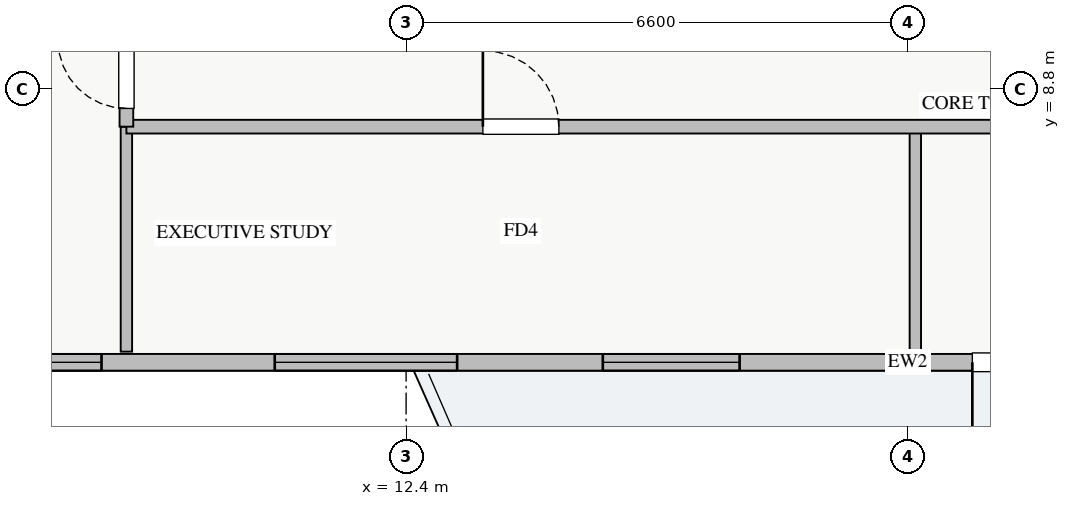
"""IFC4 building model, lengths in metres.
Left out: names, types, materials, properties, quantities, classifications, styles, units other than length and angle.
Written with IfcOpenShell. Run it as: python <this file> out.ifc"""

import sys

from ifc_helpers import new_model, si_unit, direction, frame, frame_2d, origin, place, context, subcontext, project, spatial, rectangle, extrude, source, transform, mapped, element, fill, save


model = new_model("IFC4")
c1 = context("Model", 3, precision=1e-05, world=origin(), true_north=direction((0.0, 1.0)))
c2 = subcontext(c1, "Body", "Model", "MODEL_VIEW")
j1 = project(units=[si_unit("LENGTHUNIT", "METRE"), si_unit("PLANEANGLEUNIT", "RADIAN")], contexts=[c1])
p1 = place(None, origin())
s1 = spatial("IfcSite", under=j1, at=p1, CompositionType="ELEMENT")
p2 = place(p1, origin())
s2 = spatial("IfcBuilding", under=s1, at=p2, CompositionType="ELEMENT")
p3 = place(p2, frame((0.0, 0.0, 126.25)))
s3 = spatial("IfcBuildingStorey", under=s2, at=p3, CompositionType="ELEMENT", Elevation=126.25)
p4 = place(p3, frame((6.55, 5.21, 0.0), z_axis=(0.0, 0.0, 1.0), x_axis=(1.0, 0.0, 0.0)))
e1 = element("IfcWall", 1, at=p4, inside=s3, PredefinedType="STANDARD", context=c2, shape_type="SweptSolid", body=[
    extrude(rectangle(XDim=24.9, YDim=0.22, at=frame_2d((12.45, 0.0))), origin(), (0.0, 0.0, 1.0), 2.61),
])
p5 = place(p4, frame((13.3, 0.0, 0.0)))
e2 = element("IfcOpeningElement", 2, at=p5, cuts=e1, PredefinedType="OPENING", context=c2, shape_type="SweptSolid", body=[
    extrude(rectangle(XDim=1.2, YDim=2.1, at=frame_2d((0.6, 1.05))), frame((0.0, 0.12, 0.0), z_axis=(0.0, -1.0, 0.0), x_axis=(1.0, 0.0, 0.0)), (0.0, 0.0, 1.0), 0.24),
])
p6 = place(p4, frame((0.343, 0.0, 0.9)))
e3 = element("IfcOpeningElement", 3, at=p6, cuts=e1, PredefinedType="OPENING", context=c2, shape_type="SweptSolid", body=[
    extrude(rectangle(XDim=1.5, YDim=1.5, at=frame_2d((0.75, 0.75))), frame((0.0, 0.12, 0.0), z_axis=(0.0, -1.0, 0.0), x_axis=(1.0, 0.0, 0.0)), (0.0, 0.0, 1.0), 0.24),
])
p7 = place(p4, frame((8.438, 0.0, 0.9)))
e4 = element("IfcOpeningElement", 4, at=p7, cuts=e1, PredefinedType="OPENING", context=c2, shape_type="SweptSolid", body=[
    extrude(rectangle(XDim=1.8, YDim=1.45, at=frame_2d((0.9, 0.725))), frame((0.0, 0.12, 0.0), z_axis=(0.0, -1.0, 0.0), x_axis=(1.0, 0.0, 0.0)), (0.0, 0.0, 1.0), 0.24),
])
p8 = place(p4, frame((14.813, 0.0, 0.9)))
e5 = element("IfcOpeningElement", 5, at=p8, cuts=e1, PredefinedType="OPENING", context=c2, shape_type="SweptSolid", body=[
    extrude(rectangle(XDim=1.5, YDim=1.45, at=frame_2d((0.75, 0.725))), frame((0.0, 0.12, 0.0), z_axis=(0.0, -1.0, 0.0), x_axis=(1.0, 0.0, 0.0)), (0.0, 0.0, 1.0), 0.24),
])
p9 = place(p4, frame((20.738, 0.0, 0.9)))
e6 = element("IfcOpeningElement", 6, at=p9, cuts=e1, PredefinedType="OPENING", context=c2, shape_type="SweptSolid", body=[
    extrude(rectangle(XDim=2.1, YDim=1.48, at=frame_2d((1.05, 0.74))), frame((0.0, 0.12, 0.0), z_axis=(0.0, -1.0, 0.0), x_axis=(1.0, 0.0, 0.0)), (0.0, 0.0, 1.0), 0.24),
])
p10 = place(p4, frame((4.122, 0.0, 0.9)))
e7 = element("IfcOpeningElement", 7, at=p10, cuts=e1, PredefinedType="OPENING", context=c2, shape_type="SweptSolid", body=[
    extrude(rectangle(XDim=2.4, YDim=1.5, at=frame_2d((1.2, 0.75))), frame((0.0, 0.12, 0.0), z_axis=(0.0, -1.0, 0.0), x_axis=(1.0, 0.0, 0.0)), (0.0, 0.0, 1.0), 0.24),
])
p11 = place(p3, frame((19.1, 5.35, 0.0), z_axis=(0.0, 0.0, 1.0), x_axis=(0.0, 1.0, 0.0)))
e8 = element("IfcWall", 8, at=p11, inside=s3, PredefinedType="PARTITIONING", context=c2, shape_type="SweptSolid", body=[
    extrude(rectangle(XDim=2.96, YDim=0.15, at=frame_2d((1.48, 0.0))), origin(), (0.0, 0.0, 1.0), 2.715),
])
p12 = place(p3, frame((8.72, 5.35, 0.0), z_axis=(0.0, 0.0, 1.0), x_axis=(0.0, 1.0, 0.0)))
e9 = element("IfcWall", 9, at=p12, inside=s3, PredefinedType="PARTITIONING", context=c2, shape_type="SweptSolid", body=[
    extrude(rectangle(XDim=2.96, YDim=0.15, at=frame_2d((1.48, 0.0))), origin(), (0.0, 0.0, 1.0), 3.07),
])
p13 = place(p3, frame((8.72, 8.31, 0.0), z_axis=(0.0, 0.0, 1.0), x_axis=(1.0, 0.0, 0.0)))
e10 = element("IfcWall", 10, at=p13, inside=s3, PredefinedType="PARTITIONING", context=c2, shape_type="SweptSolid", body=[
    extrude(rectangle(XDim=23.63, YDim=0.18, at=frame_2d((11.815, 0.0))), origin(), (0.0, 0.0, 1.0), 3.07),
])
p14 = place(p13, frame((4.69, 0.0, 0.0)))
e11 = element("IfcOpeningElement", 11, at=p14, cuts=e10, PredefinedType="OPENING", context=c2, shape_type="SweptSolid", body=[
    extrude(rectangle(XDim=1.0, YDim=2.05, at=frame_2d((0.5, 1.025))), frame((0.0, 0.1, 0.0), z_axis=(0.0, -1.0, 0.0), x_axis=(1.0, 0.0, 0.0)), (0.0, 0.0, 1.0), 0.2),
])
p15 = place(p13, frame((16.32, 0.0, 0.0)))
e12 = element("IfcOpeningElement", 12, at=p15, cuts=e10, PredefinedType="OPENING", context=c2, shape_type="SweptSolid", body=[
    extrude(rectangle(XDim=1.0, YDim=2.05, at=frame_2d((0.5, 1.025))), frame((0.0, 0.1, 0.0), z_axis=(0.0, -1.0, 0.0), x_axis=(1.0, 0.0, 0.0)), (0.0, 0.0, 1.0), 0.2),
])
p16 = place(p3, frame((8.72, 8.31, 0.0), z_axis=(0.0, 0.0, 1.0), x_axis=(0.0, 1.0, 0.0)))
e13 = element("IfcWall", 13, at=p16, inside=s3, PredefinedType="PARTITIONING", context=c2, shape_type="SweptSolid", body=[
    extrude(rectangle(XDim=29.37, YDim=0.18, at=frame_2d((14.685, 0.0))), origin(), (0.0, 0.0, 1.0), 3.07),
])
p17 = place(p16, frame((28.06, 0.0, 0.0)))
e14 = element("IfcOpeningElement", 14, at=p17, cuts=e13, PredefinedType="OPENING", context=c2, shape_type="SweptSolid", body=[
    extrude(rectangle(XDim=0.9, YDim=2.05, at=frame_2d((0.45, 1.025))), frame((0.0, 0.1, 0.0), z_axis=(0.0, -1.0, 0.0), x_axis=(1.0, 0.0, 0.0)), (0.0, 0.0, 1.0), 0.2),
])
p18 = place(p16, frame((0.24, 0.0, 0.0)))
e15 = element("IfcOpeningElement", 15, at=p18, cuts=e13, PredefinedType="OPENING", context=c2, shape_type="SweptSolid", body=[
    extrude(rectangle(XDim=0.9, YDim=2.05, at=frame_2d((0.45, 1.025))), frame((0.0, 0.1, 0.0), z_axis=(0.0, -1.0, 0.0), x_axis=(1.0, 0.0, 0.0)), (0.0, 0.0, 1.0), 0.2),
])
p19 = place(p16, frame((2.92, 0.0, 0.0)))
e16 = element("IfcOpeningElement", 16, at=p19, cuts=e13, PredefinedType="OPENING", context=c2, shape_type="SweptSolid", body=[
    extrude(rectangle(XDim=1.0, YDim=2.05, at=frame_2d((0.5, 1.025))), frame((0.0, 0.1, 0.0), z_axis=(0.0, -1.0, 0.0), x_axis=(1.0, 0.0, 0.0)), (0.0, 0.0, 1.0), 0.2),
])
p20 = place(p16, frame((14.315, 0.0, 0.0)))
e17 = element("IfcOpeningElement", 17, at=p20, cuts=e13, PredefinedType="OPENING", context=c2, shape_type="SweptSolid", body=[
    extrude(rectangle(XDim=1.0, YDim=2.05, at=frame_2d((0.5, 1.025))), frame((0.0, 0.1, 0.0), z_axis=(0.0, -1.0, 0.0), x_axis=(1.0, 0.0, 0.0)), (0.0, 0.0, 1.0), 0.2),
])
p21 = place(p16, frame((20.315, 0.0, 0.0)))
e18 = element("IfcOpeningElement", 18, at=p21, cuts=e13, PredefinedType="OPENING", context=c2, shape_type="SweptSolid", body=[
    extrude(rectangle(XDim=1.0, YDim=2.05, at=frame_2d((0.5, 1.025))), frame((0.0, 0.1, 0.0), z_axis=(0.0, -1.0, 0.0), x_axis=(1.0, 0.0, 0.0)), (0.0, 0.0, 1.0), 0.2),
])
m1 = source(origin(), c2, "Body", "SweptSolid", [
    extrude(rectangle(XDim=1.2, YDim=2.1, at=frame_2d((0.6, 1.05))), frame((0.0, 0.025, 0.0), z_axis=(0.0, -1.0, 0.0), x_axis=(1.0, 0.0, 0.0)), (0.0, 0.0, 1.0), 0.05),
])
p22 = place(p5, frame((1.2, 0.0, 0.0), z_axis=(0.0, 0.0, 1.0), x_axis=(-1.0, 0.0, 0.0)))
e19 = element("IfcDoor", 19, at=p22, inside=s3, OperationType="SINGLE_SWING_LEFT", PredefinedType="DOOR", context=c2, shape_type="MappedRepresentation", body=[
    mapped(m1, transform((0.0, 0.0, 0.0), x_axis=(1.0, 0.0, 0.0), y_axis=(0.0, 1.0, 0.0), z_axis=(0.0, 0.0, 1.0), scale=1.0)),
])
fill(e2, e19)
m2 = source(origin(), c2, "Body", "SweptSolid", [
    extrude(rectangle(XDim=1.5, YDim=1.5, at=frame_2d((0.75, 0.75))), frame((0.0, 0.03, 0.0), z_axis=(0.0, -1.0, 0.0), x_axis=(1.0, 0.0, 0.0)), (0.0, 0.0, 1.0), 0.06),
])
p23 = place(p6, origin())
e20 = element("IfcWindow", 20, at=p23, inside=s3, PartitioningType="TRIPLE_PANEL_VERTICAL", PredefinedType="WINDOW", context=c2, shape_type="MappedRepresentation", body=[
    mapped(m2, transform((0.0, 0.0, 0.0), x_axis=(1.0, 0.0, 0.0), y_axis=(0.0, 1.0, 0.0), z_axis=(0.0, 0.0, 1.0), scale=1.0)),
])
fill(e3, e20)
m3 = source(origin(), c2, "Body", "SweptSolid", [
    extrude(rectangle(XDim=1.8, YDim=1.45, at=frame_2d((0.9, 0.725))), frame((0.0, 0.03, 0.0), z_axis=(0.0, -1.0, 0.0), x_axis=(1.0, 0.0, 0.0)), (0.0, 0.0, 1.0), 0.06),
])
p24 = place(p7, origin())
e21 = element("IfcWindow", 21, at=p24, inside=s3, PartitioningType="DOUBLE_PANEL_VERTICAL", PredefinedType="WINDOW", context=c2, shape_type="MappedRepresentation", body=[
    mapped(m3, transform((0.0, 0.0, 0.0), x_axis=(1.0, 0.0, 0.0), y_axis=(0.0, 1.0, 0.0), z_axis=(0.0, 0.0, 1.0), scale=1.0)),
])
fill(e4, e21)
m4 = source(origin(), c2, "Body", "SweptSolid", [
    extrude(rectangle(XDim=1.0, YDim=2.05, at=frame_2d((0.5, 1.025))), frame((0.0, 0.025, 0.0), z_axis=(0.0, -1.0, 0.0), x_axis=(1.0, 0.0, 0.0)), (0.0, 0.0, 1.0), 0.05),
])
p25 = place(p14, origin())
e22 = element("IfcDoor", 22, at=p25, inside=s3, OperationType="SINGLE_SWING_LEFT", PredefinedType="DOOR", context=c2, shape_type="MappedRepresentation", body=[
    mapped(m4, transform((0.0, 0.0, 0.0), x_axis=(1.0, 0.0, 0.0), y_axis=(0.0, 1.0, 0.0), z_axis=(0.0, 0.0, 1.0), scale=1.0)),
])
fill(e11, e22)
m5 = source(origin(), c2, "Body", "SweptSolid", [
    extrude(rectangle(XDim=0.9, YDim=2.05, at=frame_2d((0.45, 1.025))), frame((0.0, 0.025, 0.0), z_axis=(0.0, -1.0, 0.0), x_axis=(1.0, 0.0, 0.0)), (0.0, 0.0, 1.0), 0.05),
])
p26 = place(p18, origin())
e23 = element("IfcDoor", 23, at=p26, inside=s3, OperationType="SINGLE_SWING_RIGHT", PredefinedType="DOOR", context=c2, shape_type="MappedRepresentation", body=[
    mapped(m5, transform((0.0, 0.0, 0.0), x_axis=(1.0, 0.0, 0.0), y_axis=(0.0, 1.0, 0.0), z_axis=(0.0, 0.0, 1.0), scale=1.0)),
])
fill(e15, e23)
m6 = source(origin(), c2, "Body", "SweptSolid", [
    extrude(rectangle(XDim=2.4, YDim=1.5, at=frame_2d((1.2, 0.75))), frame((0.0, 0.03, 0.0), z_axis=(0.0, -1.0, 0.0), x_axis=(1.0, 0.0, 0.0)), (0.0, 0.0, 1.0), 0.06),
])
p27 = place(p10, origin())
e24 = element("IfcWindow", 24, at=p27, inside=s3, PartitioningType="TRIPLE_PANEL_VERTICAL", PredefinedType="WINDOW", context=c2, shape_type="MappedRepresentation", body=[
    mapped(m6, transform((0.0, 0.0, 0.0), x_axis=(1.0, 0.0, 0.0), y_axis=(0.0, 1.0, 0.0), z_axis=(0.0, 0.0, 1.0), scale=1.0)),
])
fill(e7, e24)
save(model, sys.argv[1])
